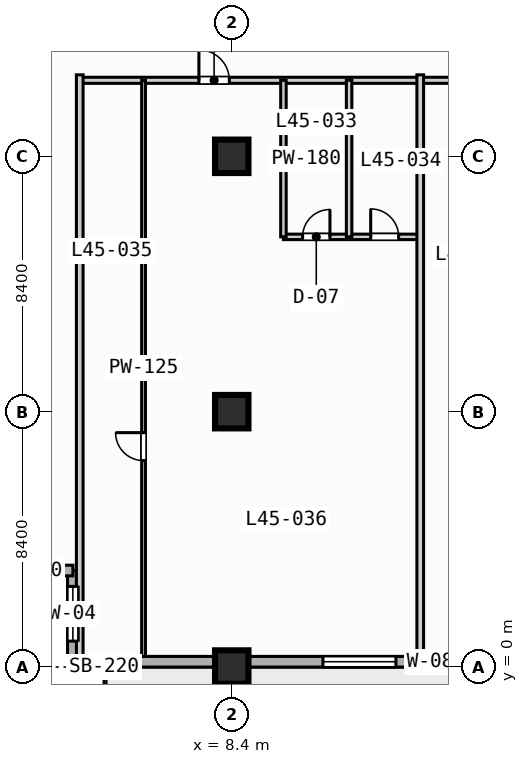
"""IFC4 building model, lengths in metres.
Left out: names, types, materials, properties, quantities, classifications, styles, units other than length and angle.
Written with IfcOpenShell. Run it as: python <this file> out.ifc"""

import sys

from ifc_helpers import new_model, si_unit, direction, frame, frame_2d, origin, origin_2d, place, context, subcontext, project, spatial, rectangle, extrude, element, fill, save


model = new_model("IFC4")
c1 = context("Model", 3, precision=1e-05, world=origin(), true_north=direction((0.0, 1.0)))
c2 = subcontext(c1, "Body", "Model", "MODEL_VIEW")
j1 = project(units=[si_unit("LENGTHUNIT", "METRE"), si_unit("PLANEANGLEUNIT", "RADIAN")], contexts=[c1])
p1 = place(None, origin())
s1 = spatial("IfcSite", under=j1, at=p1, CompositionType="ELEMENT")
p2 = place(p1, origin())
s2 = spatial("IfcBuilding", under=s1, at=p2, CompositionType="ELEMENT")
p3 = place(p2, frame((0.0, 0.0, 186.5)))
s3 = spatial("IfcBuildingStorey", under=s2, at=p3, CompositionType="ELEMENT", Elevation=186.5)
for number, where, z_axis, x_axis in (
    (1, (8.4, 0.0, 0.0), (0.0, 0.0, 1.0), (1.0, 0.0, 0.0)),
    (2, (8.4, 8.4, 0.0), (0.0, 0.0, 1.0), (1.0, 0.0, 0.0)),
    (3, (8.4, 16.8, 0.0), (0.0, 0.0, 1.0), (1.0, 0.0, 0.0)),
):
    element("IfcColumn", number, at=place(p3, frame(where, z_axis=z_axis, x_axis=x_axis)), inside=s3, PredefinedType="COLUMN", context=c2, shape_type="SweptSolid", body=[
        extrude(rectangle(XDim=1.1, YDim=1.1, at=origin_2d()), origin(), (0.0, 0.0, 1.0), 3.7),
    ])
p4 = place(p3, frame((3.175, 0.175, 0.0), z_axis=(0.0, 0.0, 1.0), x_axis=(0.0, 1.0, 0.0)))
e4 = element("IfcWall", 4, at=p4, inside=s3, PredefinedType="STANDARD", context=c2, shape_type="SweptSolid", body=[
    extrude(rectangle(XDim=3.0, YDim=0.35, at=frame_2d((1.5, 0.0))), origin(), (0.0, 0.0, 1.0), 3.47),
])
p5 = place(p4, frame((0.677, 0.0, 0.85)))
e5 = element("IfcOpeningElement", 5, at=p5, cuts=e4, PredefinedType="OPENING", context=c2, shape_type="SweptSolid", body=[
    extrude(rectangle(XDim=1.8, YDim=1.8, at=frame_2d((0.9, 0.9))), frame((0.0, 0.185, 0.0), z_axis=(0.0, -1.0, 0.0), x_axis=(1.0, 0.0, 0.0)), (0.0, 0.0, 1.0), 0.37),
])
p6 = place(p3, frame((3.175, 3.175, 0.0), z_axis=(0.0, 0.0, 1.0), x_axis=(-1.0, 0.0, 0.0)))
e6 = element("IfcWall", 6, at=p6, inside=s3, PredefinedType="STANDARD", context=c2, shape_type="SweptSolid", body=[
    extrude(rectangle(XDim=3.0, YDim=0.35, at=frame_2d((1.5, 0.0))), origin(), (0.0, 0.0, 1.0), 3.47),
])
p7 = place(p3, frame((72.425, 0.175, 0.0), z_axis=(0.0, 0.0, 1.0), x_axis=(-1.0, 0.0, 0.0)))
e7 = element("IfcWall", 7, at=p7, inside=s3, PredefinedType="STANDARD", context=c2, shape_type="SweptSolid", body=[
    extrude(rectangle(XDim=69.25, YDim=0.35, at=frame_2d((34.625, 0.0))), origin(), (0.0, 0.0, 1.0), 3.47),
])
p8 = place(p7, frame((50.725, 0.0, 0.0)))
e8 = element("IfcOpeningElement", 8, at=p8, cuts=e7, PredefinedType="OPENING", context=c2, shape_type="SweptSolid", body=[
    extrude(rectangle(XDim=1.4, YDim=2.2, at=frame_2d((0.7, 1.1))), frame((0.0, 0.185, 0.0), z_axis=(0.0, -1.0, 0.0), x_axis=(1.0, 0.0, 0.0)), (0.0, 0.0, 1.0), 0.37),
])
p9 = place(p7, frame((58.625, 0.0, 0.85)))
e9 = element("IfcOpeningElement", 9, at=p9, cuts=e7, PredefinedType="OPENING", context=c2, shape_type="SweptSolid", body=[
    extrude(rectangle(XDim=2.4, YDim=1.95, at=frame_2d((1.2, 0.975))), frame((0.0, 0.185, 0.0), z_axis=(0.0, -1.0, 0.0), x_axis=(1.0, 0.0, 0.0)), (0.0, 0.0, 1.0), 0.37),
])
p10 = place(p7, frame((41.825, 0.0, 0.85)))
e10 = element("IfcOpeningElement", 10, at=p10, cuts=e7, PredefinedType="OPENING", context=c2, shape_type="SweptSolid", body=[
    extrude(rectangle(XDim=2.4, YDim=1.95, at=frame_2d((1.2, 0.975))), frame((0.0, 0.185, 0.0), z_axis=(0.0, -1.0, 0.0), x_axis=(1.0, 0.0, 0.0)), (0.0, 0.0, 1.0), 0.37),
])
p11 = place(p7, frame((33.725, 0.0, 0.85)))
e11 = element("IfcOpeningElement", 11, at=p11, cuts=e7, PredefinedType="OPENING", context=c2, shape_type="SweptSolid", body=[
    extrude(rectangle(XDim=1.8, YDim=1.8, at=frame_2d((0.9, 0.9))), frame((0.0, 0.185, 0.0), z_axis=(0.0, -1.0, 0.0), x_axis=(1.0, 0.0, 0.0)), (0.0, 0.0, 1.0), 0.37),
])
p12 = place(p7, frame((25.025, 0.0, 0.85)))
e12 = element("IfcOpeningElement", 12, at=p12, cuts=e7, PredefinedType="OPENING", context=c2, shape_type="SweptSolid", body=[
    extrude(rectangle(XDim=2.4, YDim=1.95, at=frame_2d((1.2, 0.975))), frame((0.0, 0.185, 0.0), z_axis=(0.0, -1.0, 0.0), x_axis=(1.0, 0.0, 0.0)), (0.0, 0.0, 1.0), 0.37),
])
p13 = place(p7, frame((67.075, 0.0, 0.85)))
e13 = element("IfcOpeningElement", 13, at=p13, cuts=e7, PredefinedType="OPENING", context=c2, shape_type="SweptSolid", body=[
    extrude(rectangle(XDim=1.8, YDim=1.8, at=frame_2d((0.9, 0.9))), frame((0.0, 0.185, 0.0), z_axis=(0.0, -1.0, 0.0), x_axis=(1.0, 0.0, 0.0)), (0.0, 0.0, 1.0), 0.37),
])
p14 = place(p7, frame((56.39, 0.0, 0.85)))
e14 = element("IfcOpeningElement", 14, at=p14, cuts=e7, PredefinedType="OPENING", context=c2, shape_type="SweptSolid", body=[
    extrude(rectangle(XDim=0.72, YDim=1.8, at=frame_2d((0.36, 0.9))), frame((0.0, 0.185, 0.0), z_axis=(0.0, -1.0, 0.0), x_axis=(1.0, 0.0, 0.0)), (0.0, 0.0, 1.0), 0.37),
])
p15 = place(p7, frame((9.075, 0.0, 0.85)))
e15 = element("IfcOpeningElement", 15, at=p15, cuts=e7, PredefinedType="OPENING", context=c2, shape_type="SweptSolid", body=[
    extrude(rectangle(XDim=1.8, YDim=1.8, at=frame_2d((0.9, 0.9))), frame((0.0, 0.185, 0.0), z_axis=(0.0, -1.0, 0.0), x_axis=(1.0, 0.0, 0.0)), (0.0, 0.0, 1.0), 0.37),
])
p16 = place(p7, frame((2.675, 0.0, 0.85)))
e16 = element("IfcOpeningElement", 16, at=p16, cuts=e7, PredefinedType="OPENING", context=c2, shape_type="SweptSolid", body=[
    extrude(rectangle(XDim=1.8, YDim=1.8, at=frame_2d((0.9, 0.9))), frame((0.0, 0.185, 0.0), z_axis=(0.0, -1.0, 0.0), x_axis=(1.0, 0.0, 0.0)), (0.0, 0.0, 1.0), 0.37),
])
p17 = place(p3, frame((3.4, 19.3, 0.0), z_axis=(0.0, 0.0, 1.0), x_axis=(1.0, 0.0, 0.0)))
e17 = element("IfcWall", 17, at=p17, inside=s3, PredefinedType="PARTITIONING", context=c2, shape_type="SweptSolid", body=[
    extrude(rectangle(XDim=35.8, YDim=0.2, at=frame_2d((17.9, 0.0))), origin(), (0.0, 0.0, 1.0), 3.47),
])
p18 = place(p17, frame((3.92, 0.0, 0.0)))
e18 = element("IfcOpeningElement", 18, at=p18, cuts=e17, PredefinedType="OPENING", context=c2, shape_type="SweptSolid", body=[
    extrude(rectangle(XDim=1.0, YDim=2.15, at=frame_2d((0.5, 1.075))), frame((0.0, 0.11, 0.0), z_axis=(0.0, -1.0, 0.0), x_axis=(1.0, 0.0, 0.0)), (0.0, 0.0, 1.0), 0.22),
])
p19 = place(p17, frame((14.945, 0.0, 0.0)))
e19 = element("IfcOpeningElement", 19, at=p19, cuts=e17, PredefinedType="OPENING", context=c2, shape_type="SweptSolid", body=[
    extrude(rectangle(XDim=1.0, YDim=2.15, at=frame_2d((0.5, 1.075))), frame((0.0, 0.11, 0.0), z_axis=(0.0, -1.0, 0.0), x_axis=(1.0, 0.0, 0.0)), (0.0, 0.0, 1.0), 0.22),
])
p20 = place(p17, frame((22.92, 0.0, 0.0)))
e20 = element("IfcOpeningElement", 20, at=p20, cuts=e17, PredefinedType="OPENING", context=c2, shape_type="SweptSolid", body=[
    extrude(rectangle(XDim=1.0, YDim=2.15, at=frame_2d((0.5, 1.075))), frame((0.0, 0.11, 0.0), z_axis=(0.0, -1.0, 0.0), x_axis=(1.0, 0.0, 0.0)), (0.0, 0.0, 1.0), 0.22),
])
p21 = place(p17, frame((29.82, 0.0, 0.0)))
e21 = element("IfcOpeningElement", 21, at=p21, cuts=e17, PredefinedType="OPENING", context=c2, shape_type="SweptSolid", body=[
    extrude(rectangle(XDim=1.0, YDim=2.15, at=frame_2d((0.5, 1.075))), frame((0.0, 0.11, 0.0), z_axis=(0.0, -1.0, 0.0), x_axis=(1.0, 0.0, 0.0)), (0.0, 0.0, 1.0), 0.22),
])
p22 = place(p3, frame((3.4, 0.2, 0.0), z_axis=(0.0, 0.0, 1.0), x_axis=(0.0, 1.0, 0.0)))
e22 = element("IfcWall", 22, at=p22, inside=s3, PredefinedType="PARTITIONING", context=c2, shape_type="SweptSolid", body=[
    extrude(rectangle(XDim=19.28, YDim=0.22, at=frame_2d((9.64, 0.0))), origin(), (0.0, 0.0, 1.0), 3.47),
])
p23 = place(p3, frame((10.1, 14.15, 0.0), z_axis=(0.0, 0.0, 1.0), x_axis=(1.0, 0.0, 0.0)))
e23 = element("IfcWall", 23, at=p23, inside=s3, PredefinedType="PLUMBINGWALL", context=c2, shape_type="SweptSolid", body=[
    extrude(rectangle(XDim=4.5, YDim=0.18, at=frame_2d((2.25, 0.0))), origin(), (0.0, 0.0, 1.0), 3.47),
])
p24 = place(p23, frame((0.63, 0.0, 0.0)))
e24 = element("IfcOpeningElement", 24, at=p24, cuts=e23, PredefinedType="OPENING", context=c2, shape_type="SweptSolid", body=[
    extrude(rectangle(XDim=0.9, YDim=2.1, at=frame_2d((0.45, 1.05))), frame((0.0, 0.1, 0.0), z_axis=(0.0, -1.0, 0.0), x_axis=(1.0, 0.0, 0.0)), (0.0, 0.0, 1.0), 0.2),
])
p25 = place(p23, frame((2.87, 0.0, 0.0)))
e25 = element("IfcOpeningElement", 25, at=p25, cuts=e23, PredefinedType="OPENING", context=c2, shape_type="SweptSolid", body=[
    extrude(rectangle(XDim=0.92, YDim=2.1, at=frame_2d((0.46, 1.05))), frame((0.0, 0.1, 0.0), z_axis=(0.0, -1.0, 0.0), x_axis=(1.0, 0.0, 0.0)), (0.0, 0.0, 1.0), 0.2),
])
for number, where, z_axis, x_axis in (
    (26, (10.1, 14.15, 0.0), (0.0, 0.0, 1.0), (0.0, 1.0, 0.0)),
    (27, (12.26, 14.15, 0.0), (0.0, 0.0, 1.0), (0.0, 1.0, 0.0)),
):
    element("IfcWall", number, at=place(p3, frame(where, z_axis=z_axis, x_axis=x_axis)), inside=s3, PredefinedType="PLUMBINGWALL", context=c2, shape_type="SweptSolid", body=[
        extrude(rectangle(XDim=5.15, YDim=0.18, at=frame_2d((2.575, 0.0))), origin(), (0.0, 0.0, 1.0), 3.47),
    ])
p26 = place(p3, frame((5.5, 0.35, 0.0), z_axis=(0.0, 0.0, 1.0), x_axis=(0.0, 1.0, 0.0)))
e28 = element("IfcWall", 28, at=p26, inside=s3, PredefinedType="PARTITIONING", context=c2, shape_type="SweptSolid", body=[
    extrude(rectangle(XDim=18.95, YDim=0.125, at=frame_2d((9.475, 0.0))), origin(), (0.0, 0.0, 1.0), 3.47),
])
p27 = place(p26, frame((6.44, 0.0, 0.0)))
e29 = element("IfcOpeningElement", 29, at=p27, cuts=e28, PredefinedType="OPENING", context=c2, shape_type="SweptSolid", body=[
    extrude(rectangle(XDim=0.92, YDim=2.1, at=frame_2d((0.46, 1.05))), frame((0.0, 0.073, 0.0), z_axis=(0.0, -1.0, 0.0), x_axis=(1.0, 0.0, 0.0)), (0.0, 0.0, 1.0), 0.145),
])
p28 = place(p3, frame((14.6, 0.2, 0.0), z_axis=(0.0, 0.0, 1.0), x_axis=(0.0, 1.0, 0.0)))
e30 = element("IfcWall", 30, at=p28, inside=s3, PredefinedType="PARTITIONING", context=c2, shape_type="SweptSolid", body=[
    extrude(rectangle(XDim=19.28, YDim=0.22, at=frame_2d((9.64, 0.0))), origin(), (0.0, 0.0, 1.0), 3.47),
])
p29 = place(p5, origin())
e31 = element("IfcWindow", 31, at=p29, inside=s3, PartitioningType="SINGLE_PANEL", PredefinedType="WINDOW", context=c2, shape_type="SweptSolid", body=[
    extrude(rectangle(XDim=1.8, YDim=1.8, at=frame_2d((0.9, 0.9))), frame((0.0, 0.03, 0.0), z_axis=(0.0, -1.0, 0.0), x_axis=(1.0, 0.0, 0.0)), (0.0, 0.0, 1.0), 0.06),
])
fill(e5, e31)
p30 = place(p9, origin())
e32 = element("IfcWindow", 32, at=p30, inside=s3, PartitioningType="SINGLE_PANEL", PredefinedType="WINDOW", context=c2, shape_type="SweptSolid", body=[
    extrude(rectangle(XDim=2.4, YDim=1.95, at=frame_2d((1.2, 0.975))), frame((0.0, 0.03, 0.0), z_axis=(0.0, -1.0, 0.0), x_axis=(1.0, 0.0, 0.0)), (0.0, 0.0, 1.0), 0.06),
])
fill(e9, e32)
p31 = place(p13, origin())
e33 = element("IfcWindow", 33, at=p31, inside=s3, PartitioningType="SINGLE_PANEL", PredefinedType="WINDOW", context=c2, shape_type="SweptSolid", body=[
    extrude(rectangle(XDim=1.8, YDim=1.8, at=frame_2d((0.9, 0.9))), frame((0.0, 0.03, 0.0), z_axis=(0.0, -1.0, 0.0), x_axis=(1.0, 0.0, 0.0)), (0.0, 0.0, 1.0), 0.06),
])
fill(e13, e33)
p32 = place(p14, origin())
e34 = element("IfcWindow", 34, at=p32, inside=s3, PartitioningType="SINGLE_PANEL", PredefinedType="WINDOW", context=c2, shape_type="SweptSolid", body=[
    extrude(rectangle(XDim=0.72, YDim=1.8, at=frame_2d((0.36, 0.9))), frame((0.0, 0.03, 0.0), z_axis=(0.0, -1.0, 0.0), x_axis=(1.0, 0.0, 0.0)), (0.0, 0.0, 1.0), 0.06),
])
fill(e14, e34)
p33 = place(p18, origin())
e35 = element("IfcDoor", 35, at=p33, inside=s3, OperationType="SINGLE_SWING_LEFT", PredefinedType="DOOR", context=c2, shape_type="SweptSolid", body=[
    extrude(rectangle(XDim=1.0, YDim=2.15, at=frame_2d((0.5, 1.075))), frame((0.0, 0.025, 0.0), z_axis=(0.0, -1.0, 0.0), x_axis=(1.0, 0.0, 0.0)), (0.0, 0.0, 1.0), 0.05),
])
fill(e18, e35)
p34 = place(p24, origin())
e36 = element("IfcDoor", 36, at=p34, inside=s3, OperationType="SINGLE_SWING_RIGHT", PredefinedType="DOOR", context=c2, shape_type="SweptSolid", body=[
    extrude(rectangle(XDim=0.9, YDim=2.1, at=frame_2d((0.45, 1.05))), frame((0.0, 0.025, 0.0), z_axis=(0.0, -1.0, 0.0), x_axis=(1.0, 0.0, 0.0)), (0.0, 0.0, 1.0), 0.05),
])
fill(e24, e36)
p35 = place(p25, origin())
e37 = element("IfcDoor", 37, at=p35, inside=s3, OperationType="SINGLE_SWING_LEFT", PredefinedType="DOOR", context=c2, shape_type="SweptSolid", body=[
    extrude(rectangle(XDim=0.92, YDim=2.1, at=frame_2d((0.46, 1.05))), frame((0.0, 0.025, 0.0), z_axis=(0.0, -1.0, 0.0), x_axis=(1.0, 0.0, 0.0)), (0.0, 0.0, 1.0), 0.05),
])
fill(e25, e37)
p36 = place(p27, origin())
e38 = element("IfcDoor", 38, at=p36, inside=s3, OperationType="SINGLE_SWING_RIGHT", PredefinedType="DOOR", context=c2, shape_type="SweptSolid", body=[
    extrude(rectangle(XDim=0.92, YDim=2.1, at=frame_2d((0.46, 1.05))), frame((0.0, 0.025, 0.0), z_axis=(0.0, -1.0, 0.0), x_axis=(1.0, 0.0, 0.0)), (0.0, 0.0, 1.0), 0.05),
])
fill(e29, e38)
save(model, sys.argv[1])
